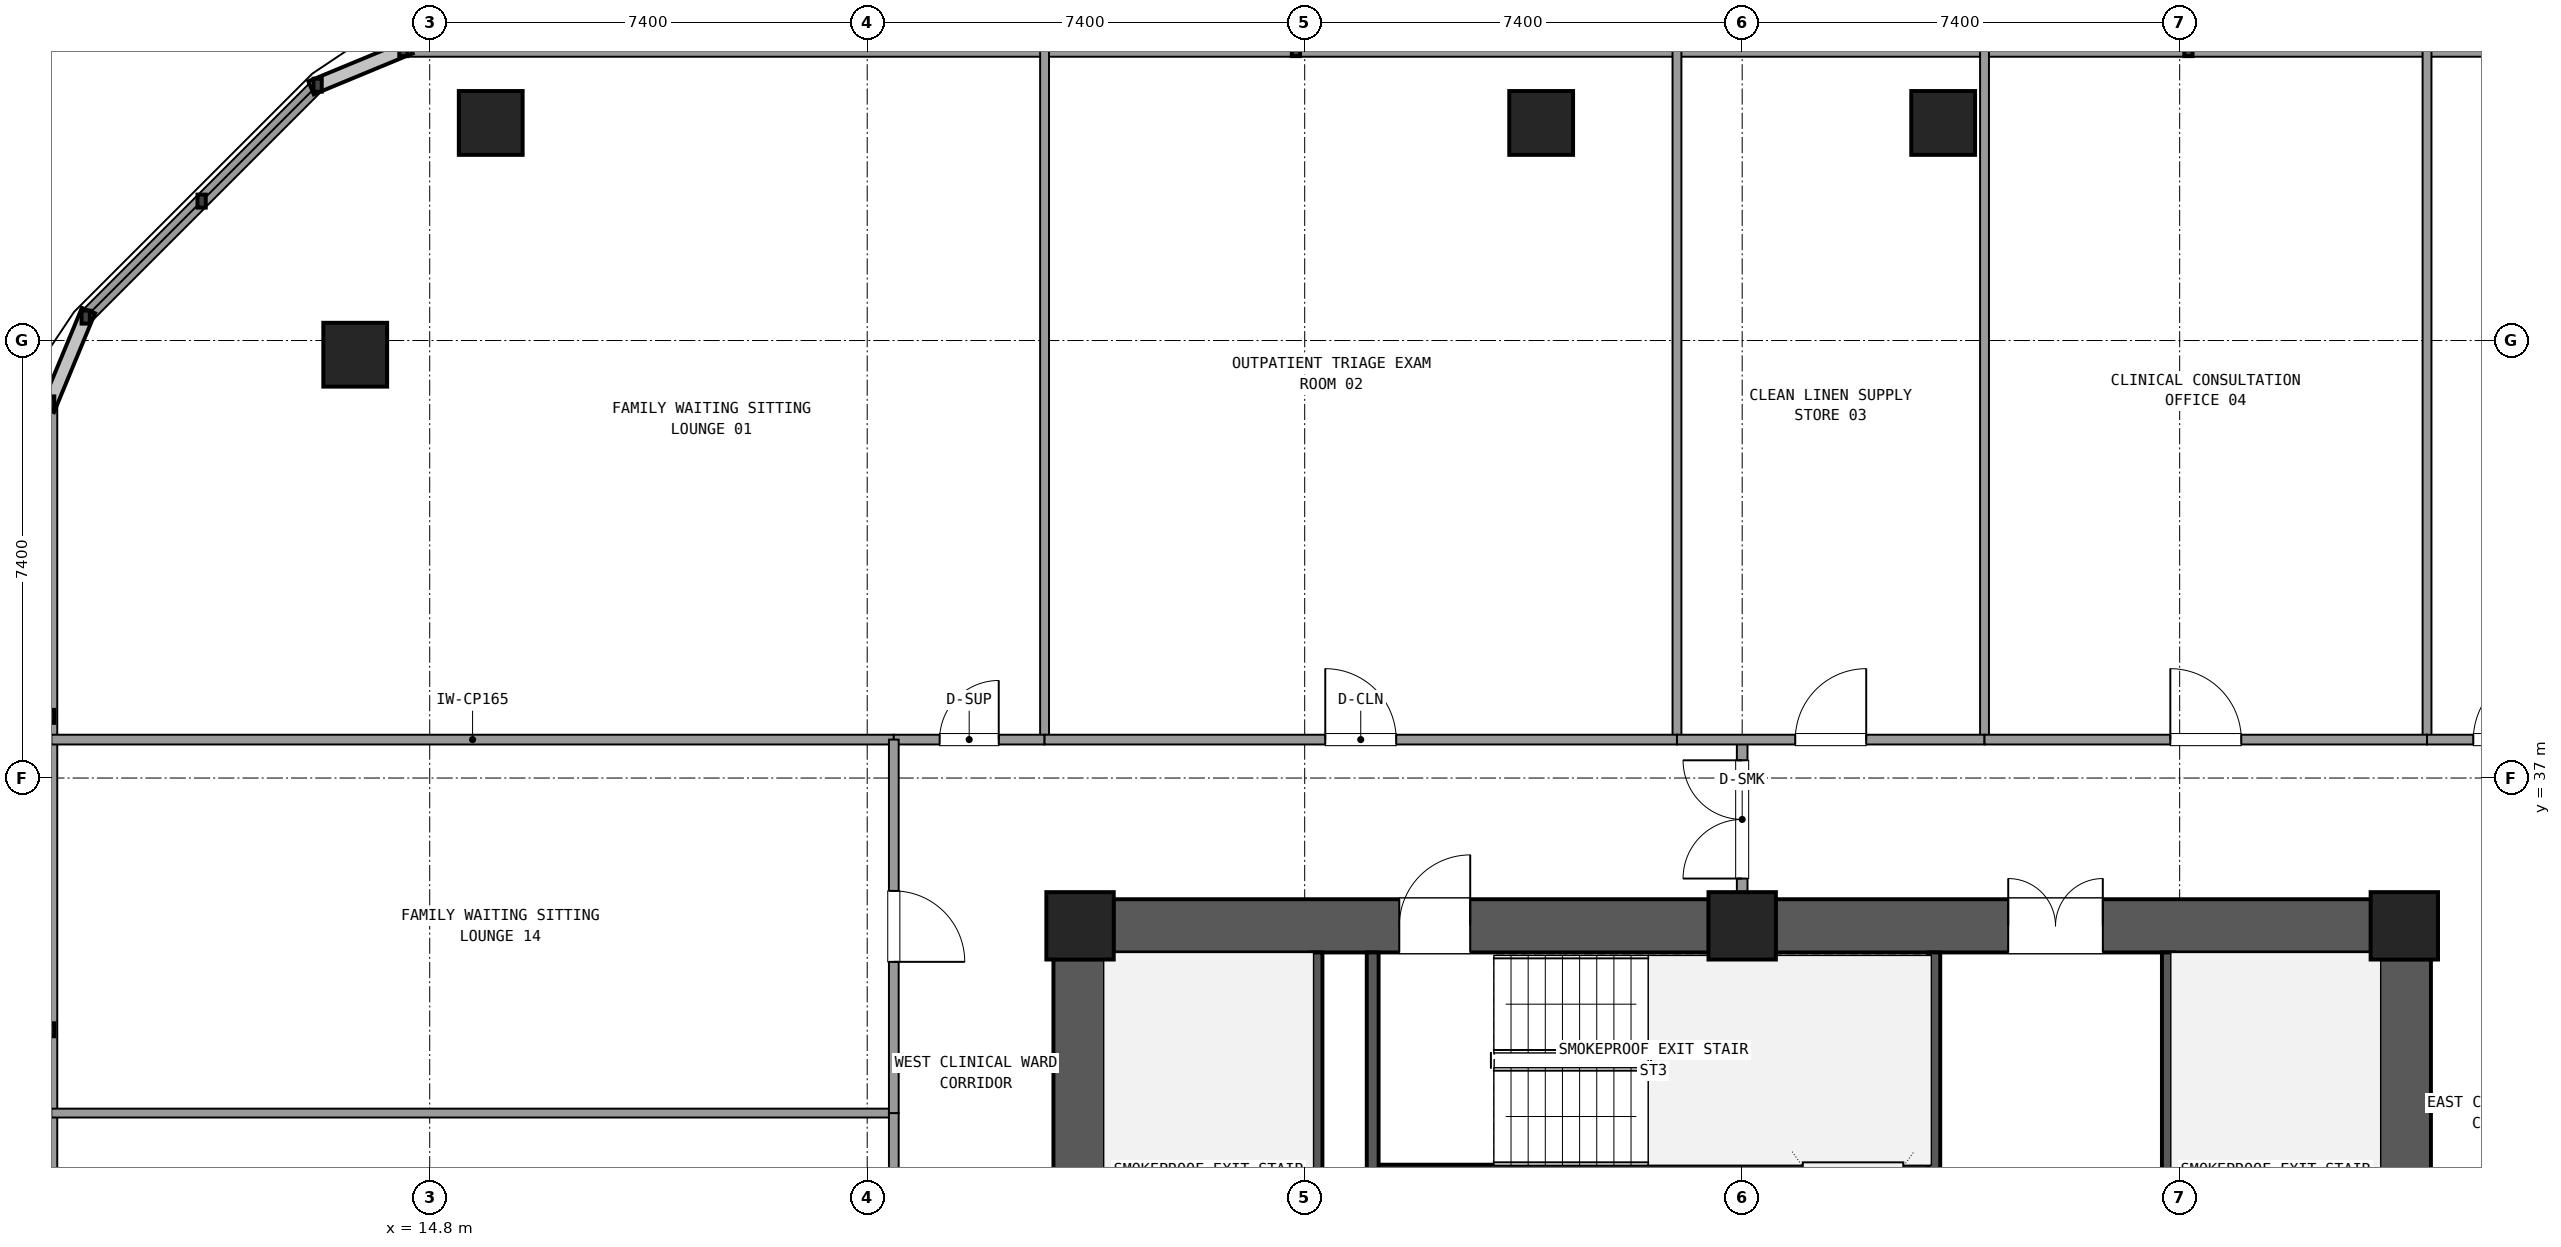
"""IFC4 building model, lengths in metres.
Left out: names, types, materials, properties, quantities, classifications, styles, units other than length and angle.
Written with IfcOpenShell. Run it as: python <this file> out.ifc"""

import sys

from ifc_helpers import new_model, si_unit, direction, frame, frame_2d, origin, origin_2d, place, context, subcontext, project, spatial, rectangle, extrude, element, fill, save


model = new_model("IFC4")
c1 = context("Model", 3, precision=1e-05, world=origin(), true_north=direction((0.0, 1.0)))
c2 = subcontext(c1, "Body", "Model", "MODEL_VIEW")
j1 = project(units=[si_unit("LENGTHUNIT", "METRE"), si_unit("PLANEANGLEUNIT", "RADIAN")], contexts=[c1])
p1 = place(None, origin())
s1 = spatial("IfcSite", under=j1, at=p1, CompositionType="ELEMENT")
p2 = place(p1, origin())
s2 = spatial("IfcBuilding", under=s1, at=p2, CompositionType="ELEMENT")
p3 = place(p2, frame((0.0, 0.0, 41.94)))
s3 = spatial("IfcBuildingStorey", under=s2, at=p3, CompositionType="ELEMENT", Elevation=41.94)
for number, where, z_axis, x_axis in (
    (1, (48.2, 34.5, 0.0), (0.0, 0.0, 1.0), (1.0, 0.0, 0.0)),
    (2, (37.0, 34.5, 0.0), (0.0, 0.0, 1.0), (1.0, 0.0, 0.0)),
    (3, (25.8, 34.5, 0.0), (0.0, 0.0, 1.0), (1.0, 0.0, 0.0)),
):
    element("IfcColumn", number, at=place(p3, frame(where, z_axis=z_axis, x_axis=x_axis)), inside=s3, PredefinedType="COLUMN", context=c2, shape_type="SweptSolid", body=[
        extrude(rectangle(XDim=1.14, YDim=1.14, at=origin_2d()), origin(), (0.0, 0.0, 1.0), 3.6),
    ])
p4 = place(p3, frame((48.2, 26.465, 0.0), z_axis=(0.0, 0.0, 1.0), x_axis=(0.0, 1.0, 0.0)))
e4 = element("IfcWall", 4, at=p4, inside=s3, PredefinedType="SHEAR", context=c2, shape_type="SweptSolid", body=[
    extrude(rectangle(XDim=7.47, YDim=0.9, at=frame_2d((3.735, 0.0))), origin(), (0.0, 0.0, 1.0), 3.32),
])
p5 = place(p3, frame((47.635, 34.5, 0.0), z_axis=(0.0, 0.0, 1.0), x_axis=(-1.0, 0.0, 0.0)))
e5 = element("IfcWall", 5, at=p5, inside=s3, PredefinedType="SHEAR", context=c2, shape_type="SweptSolid", body=[
    extrude(rectangle(XDim=10.07, YDim=0.9, at=frame_2d((5.035, 0.0))), origin(), (0.0, 0.0, 1.0), 3.32),
])
p6 = place(p5, frame((4.535, 0.0, 0.0)))
e6 = element("IfcOpeningElement", 6, at=p6, cuts=e5, PredefinedType="OPENING", context=c2, shape_type="SweptSolid", body=[
    extrude(rectangle(XDim=1.6, YDim=2.2, at=frame_2d((0.8, 1.1))), frame((0.0, 0.46, 0.0), z_axis=(0.0, -1.0, 0.0), x_axis=(1.0, 0.0, 0.0)), (0.0, 0.0, 1.0), 0.92),
])
p7 = place(p3, frame((36.435, 34.5, 0.0), z_axis=(0.0, 0.0, 1.0), x_axis=(-1.0, 0.0, 0.0)))
e7 = element("IfcWall", 7, at=p7, inside=s3, PredefinedType="SHEAR", context=c2, shape_type="SweptSolid", body=[
    extrude(rectangle(XDim=10.07, YDim=0.9, at=frame_2d((5.035, 0.0))), origin(), (0.0, 0.0, 1.0), 3.32),
])
p8 = place(p7, frame((4.035, 0.0, 0.0)))
e8 = element("IfcOpeningElement", 8, at=p8, cuts=e7, PredefinedType="OPENING", context=c2, shape_type="SweptSolid", body=[
    extrude(rectangle(XDim=1.2, YDim=2.15, at=frame_2d((0.6, 1.075))), frame((0.0, 0.46, 0.0), z_axis=(0.0, -1.0, 0.0), x_axis=(1.0, 0.0, 0.0)), (0.0, 0.0, 1.0), 0.92),
])
p9 = place(p3, frame((25.8, 33.935, 0.0), z_axis=(0.0, 0.0, 1.0), x_axis=(0.0, -1.0, 0.0)))
e9 = element("IfcWall", 9, at=p9, inside=s3, PredefinedType="SHEAR", context=c2, shape_type="SweptSolid", body=[
    extrude(rectangle(XDim=7.47, YDim=0.9, at=frame_2d((3.735, 0.0))), origin(), (0.0, 0.0, 1.0), 3.32),
])
for number, where, z_axis, x_axis in (
    (10, (40.4, 48.08, 0.0), (0.0, 0.0, 1.0), (1.0, 0.0, 0.0)),
    (11, (33.6, 48.08, 0.0), (0.0, 0.0, 1.0), (1.0, 0.0, 0.0)),
    (12, (15.832, 48.08, 0.0), (0.0, 0.0, 1.0), (1.0, 0.0, 0.0)),
    (13, (13.54, 44.16, 0.0), (0.0, 0.0, 1.0), (1.0, 0.0, 0.0)),
):
    element("IfcColumn", number, at=place(p3, frame(where, z_axis=z_axis, x_axis=x_axis)), inside=s3, PredefinedType="COLUMN", context=c2, shape_type="SweptSolid", body=[
        extrude(rectangle(XDim=1.08, YDim=1.08, at=origin_2d()), origin(), (0.0, 0.0, 1.0), 3.6),
    ])
p10 = place(p3, frame((59.645, 49.32, 0.0), z_axis=(0.0, 0.0, 1.0), x_axis=(-1.0, 0.0, 0.0)))
e14 = element("IfcWall", 14, at=p10, inside=s3, PredefinedType="SOLIDWALL", context=c2, shape_type="SweptSolid", body=[
    extrude(rectangle(XDim=45.29, YDim=0.24, at=frame_2d((22.645, 0.0))), origin(), (0.0, 0.0, 1.0), 0.85),
])
p11 = place(p3, frame((12.904, 48.719, 0.0), z_axis=(0.0, 0.0, 1.0), x_axis=(-0.707106781187, -0.707106781187, 0.0)))
e15 = element("IfcWall", 15, at=p11, inside=s3, PredefinedType="SOLIDWALL", context=c2, shape_type="SweptSolid", body=[
    extrude(rectangle(XDim=5.548, YDim=0.24, at=frame_2d((2.774, 0.0))), origin(), (0.0, 0.0, 1.0), 0.85),
])
p12 = place(p3, frame((8.38, 43.345, 0.0), z_axis=(0.0, 0.0, 1.0), x_axis=(0.0, -1.0, 0.0)))
e16 = element("IfcWall", 16, at=p12, inside=s3, PredefinedType="SOLIDWALL", context=c2, shape_type="SweptSolid", body=[
    extrude(rectangle(XDim=15.905, YDim=0.24, at=frame_2d((7.953, 0.0))), origin(), (0.0, 0.0, 1.0), 0.85),
])
for number, where, z_axis, x_axis in (
    (17, (29.8, 24.65, 0.0), (0.0, 0.0, 1.0), (0.0, 1.0, 0.0)),
    (18, (44.2, 24.65, 0.0), (0.0, 0.0, 1.0), (0.0, 1.0, 0.0)),
):
    element("IfcWall", number, at=place(p3, frame(where, z_axis=z_axis, x_axis=x_axis)), inside=s3, PredefinedType="SHEAR", context=c2, shape_type="SweptSolid", body=[
        extrude(rectangle(XDim=9.4, YDim=0.2, at=frame_2d((4.7, 0.0))), origin(), (0.0, 0.0, 1.0), 3.32),
    ])
p13 = place(p3, frame((30.75, 30.36, 0.0), z_axis=(0.0, 0.0, 1.0), x_axis=(1.0, 0.0, 0.0)))
e19 = element("IfcWall", 19, at=p13, inside=s3, PredefinedType="SHEAR", context=c2, shape_type="SweptSolid", body=[
    extrude(rectangle(XDim=9.5, YDim=0.2, at=frame_2d((4.75, 0.0))), origin(), (0.0, 0.0, 1.0), 3.32),
])
for number, where, z_axis, x_axis in (
    (20, (30.75, 30.36, 0.0), (0.0, 0.0, 1.0), (0.0, 1.0, 0.0)),
    (21, (40.25, 30.36, 0.0), (0.0, 0.0, 1.0), (0.0, 1.0, 0.0)),
):
    element("IfcWall", number, at=place(p3, frame(where, z_axis=z_axis, x_axis=x_axis)), inside=s3, PredefinedType="SHEAR", context=c2, shape_type="SweptSolid", body=[
        extrude(rectangle(XDim=3.69, YDim=0.2, at=frame_2d((1.845, 0.0))), origin(), (0.0, 0.0, 1.0), 3.32),
    ])
p14 = place(p3, frame((37.0, 34.95, 0.0), z_axis=(0.0, 0.0, 1.0), x_axis=(0.0, 1.0, 0.0)))
e22 = element("IfcWall", 22, at=p14, inside=s3, PredefinedType="PARTITIONING", context=c2, shape_type="SweptSolid", body=[
    extrude(rectangle(XDim=2.7, YDim=0.18, at=frame_2d((1.35, 0.0))), origin(), (0.0, 0.0, 1.0), 2.61),
])
p15 = place(p14, frame((0.35, 0.0, 0.0)))
e23 = element("IfcOpeningElement", 23, at=p15, cuts=e22, PredefinedType="OPENING", context=c2, shape_type="SweptSolid", body=[
    extrude(rectangle(XDim=2.0, YDim=2.2, at=frame_2d((1.0, 1.1))), frame((0.0, 0.1, 0.0), z_axis=(0.0, -1.0, 0.0), x_axis=(1.0, 0.0, 0.0)), (0.0, 0.0, 1.0), 0.2),
])
p16 = place(p3, frame((8.4, 37.65, 0.0), z_axis=(0.0, 0.0, 1.0), x_axis=(1.0, 0.0, 0.0)))
e24 = element("IfcWall", 24, at=p16, inside=s3, PredefinedType="PARTITIONING", context=c2, shape_type="SweptSolid", body=[
    extrude(rectangle(XDim=14.25, YDim=0.165, at=frame_2d((7.125, 0.0))), origin(), (0.0, 0.0, 1.0), 2.61),
])
p17 = place(p3, frame((25.2, 37.65, 0.0), z_axis=(0.0, 0.0, 1.0), x_axis=(0.0, 1.0, 0.0)))
e25 = element("IfcWall", 25, at=p17, inside=s3, PredefinedType="PARTITIONING", context=c2, shape_type="SweptSolid", body=[
    extrude(rectangle(XDim=11.65, YDim=0.15, at=frame_2d((5.825, 0.0))), origin(), (0.0, 0.0, 1.0), 2.61),
])
p18 = place(p3, frame((22.65, 37.65, 0.0), z_axis=(0.0, 0.0, 1.0), x_axis=(1.0, 0.0, 0.0)))
e26 = element("IfcWall", 26, at=p18, inside=s3, PredefinedType="PARTITIONING", context=c2, shape_type="SweptSolid", body=[
    extrude(rectangle(XDim=2.55, YDim=0.165, at=frame_2d((1.275, 0.0))), origin(), (0.0, 0.0, 1.0), 2.61),
])
p19 = place(p18, frame((0.775, 0.0, 0.0)))
e27 = element("IfcOpeningElement", 27, at=p19, cuts=e26, PredefinedType="OPENING", context=c2, shape_type="SweptSolid", body=[
    extrude(rectangle(XDim=1.0, YDim=2.15, at=frame_2d((0.5, 1.075))), frame((0.0, 0.093, 0.0), z_axis=(0.0, -1.0, 0.0), x_axis=(1.0, 0.0, 0.0)), (0.0, 0.0, 1.0), 0.185),
])
p20 = place(p3, frame((35.897, 37.65, 0.0), z_axis=(0.0, 0.0, 1.0), x_axis=(0.0, 1.0, 0.0)))
e28 = element("IfcWall", 28, at=p20, inside=s3, PredefinedType="PARTITIONING", context=c2, shape_type="SweptSolid", body=[
    extrude(rectangle(XDim=11.65, YDim=0.15, at=frame_2d((5.825, 0.0))), origin(), (0.0, 0.0, 1.0), 2.61),
])
p21 = place(p3, frame((25.2, 37.65, 0.0), z_axis=(0.0, 0.0, 1.0), x_axis=(1.0, 0.0, 0.0)))
e29 = element("IfcWall", 29, at=p21, inside=s3, PredefinedType="PARTITIONING", context=c2, shape_type="SweptSolid", body=[
    extrude(rectangle(XDim=10.697, YDim=0.165, at=frame_2d((5.349, 0.0))), origin(), (0.0, 0.0, 1.0), 2.61),
])
p22 = place(p21, frame((4.748, 0.0, 0.0)))
e30 = element("IfcOpeningElement", 30, at=p22, cuts=e29, PredefinedType="OPENING", context=c2, shape_type="SweptSolid", body=[
    extrude(rectangle(XDim=1.2, YDim=2.15, at=frame_2d((0.6, 1.075))), frame((0.0, 0.093, 0.0), z_axis=(0.0, -1.0, 0.0), x_axis=(1.0, 0.0, 0.0)), (0.0, 0.0, 1.0), 0.185),
])
p23 = place(p3, frame((41.099, 37.65, 0.0), z_axis=(0.0, 0.0, 1.0), x_axis=(0.0, 1.0, 0.0)))
e31 = element("IfcWall", 31, at=p23, inside=s3, PredefinedType="PARTITIONING", context=c2, shape_type="SweptSolid", body=[
    extrude(rectangle(XDim=11.65, YDim=0.15, at=frame_2d((5.825, 0.0))), origin(), (0.0, 0.0, 1.0), 2.61),
])
p24 = place(p3, frame((35.897, 37.65, 0.0), z_axis=(0.0, 0.0, 1.0), x_axis=(1.0, 0.0, 0.0)))
e32 = element("IfcWall", 32, at=p24, inside=s3, PredefinedType="PARTITIONING", context=c2, shape_type="SweptSolid", body=[
    extrude(rectangle(XDim=5.202, YDim=0.165, at=frame_2d((2.601, 0.0))), origin(), (0.0, 0.0, 1.0), 2.61),
])
p25 = place(p24, frame((2.001, 0.0, 0.0)))
e33 = element("IfcOpeningElement", 33, at=p25, cuts=e32, PredefinedType="OPENING", context=c2, shape_type="SweptSolid", body=[
    extrude(rectangle(XDim=1.2, YDim=2.15, at=frame_2d((0.6, 1.075))), frame((0.0, 0.093, 0.0), z_axis=(0.0, -1.0, 0.0), x_axis=(1.0, 0.0, 0.0)), (0.0, 0.0, 1.0), 0.185),
])
p26 = place(p3, frame((48.584, 37.65, 0.0), z_axis=(0.0, 0.0, 1.0), x_axis=(0.0, 1.0, 0.0)))
e34 = element("IfcWall", 34, at=p26, inside=s3, PredefinedType="PARTITIONING", context=c2, shape_type="SweptSolid", body=[
    extrude(rectangle(XDim=11.65, YDim=0.15, at=frame_2d((5.825, 0.0))), origin(), (0.0, 0.0, 1.0), 2.61),
])
p27 = place(p3, frame((41.099, 37.65, 0.0), z_axis=(0.0, 0.0, 1.0), x_axis=(1.0, 0.0, 0.0)))
e35 = element("IfcWall", 35, at=p27, inside=s3, PredefinedType="PARTITIONING", context=c2, shape_type="SweptSolid", body=[
    extrude(rectangle(XDim=7.485, YDim=0.165, at=frame_2d((3.742, 0.0))), origin(), (0.0, 0.0, 1.0), 2.61),
])
p28 = place(p27, frame((3.143, 0.0, 0.0)))
e36 = element("IfcOpeningElement", 36, at=p28, cuts=e35, PredefinedType="OPENING", context=c2, shape_type="SweptSolid", body=[
    extrude(rectangle(XDim=1.2, YDim=2.15, at=frame_2d((0.6, 1.075))), frame((0.0, 0.093, 0.0), z_axis=(0.0, -1.0, 0.0), x_axis=(1.0, 0.0, 0.0)), (0.0, 0.0, 1.0), 0.185),
])
p29 = place(p3, frame((48.584, 37.65, 0.0), z_axis=(0.0, 0.0, 1.0), x_axis=(1.0, 0.0, 0.0)))
e37 = element("IfcWall", 37, at=p29, inside=s3, PredefinedType="PARTITIONING", context=c2, shape_type="SweptSolid", body=[
    extrude(rectangle(XDim=2.766, YDim=0.165, at=frame_2d((1.383, 0.0))), origin(), (0.0, 0.0, 1.0), 2.61),
])
p30 = place(p29, frame((0.783, 0.0, 0.0)))
e38 = element("IfcOpeningElement", 38, at=p30, cuts=e37, PredefinedType="OPENING", context=c2, shape_type="SweptSolid", body=[
    extrude(rectangle(XDim=1.2, YDim=2.15, at=frame_2d((0.6, 1.075))), frame((0.0, 0.093, 0.0), z_axis=(0.0, -1.0, 0.0), x_axis=(1.0, 0.0, 0.0)), (0.0, 0.0, 1.0), 0.185),
])
p31 = place(p3, frame((22.65, 31.333, 0.0), z_axis=(0.0, 0.0, 1.0), x_axis=(-1.0, 0.0, 0.0)))
e39 = element("IfcWall", 39, at=p31, inside=s3, PredefinedType="PARTITIONING", context=c2, shape_type="SweptSolid", body=[
    extrude(rectangle(XDim=14.25, YDim=0.15, at=frame_2d((7.125, 0.0))), origin(), (0.0, 0.0, 1.0), 2.61),
])
p32 = place(p3, frame((22.65, 27.7, 0.0), z_axis=(0.0, 0.0, 1.0), x_axis=(0.0, 1.0, 0.0)))
e40 = element("IfcWall", 40, at=p32, inside=s3, PredefinedType="PARTITIONING", context=c2, shape_type="SweptSolid", body=[
    extrude(rectangle(XDim=3.633, YDim=0.165, at=frame_2d((1.816, 0.0))), origin(), (0.0, 0.0, 1.0), 2.61),
])
p33 = place(p32, frame((1.216, 0.0, 0.0)))
e41 = element("IfcOpeningElement", 41, at=p33, cuts=e40, PredefinedType="OPENING", context=c2, shape_type="SweptSolid", body=[
    extrude(rectangle(XDim=1.2, YDim=2.15, at=frame_2d((0.6, 1.075))), frame((0.0, 0.093, 0.0), z_axis=(0.0, -1.0, 0.0), x_axis=(1.0, 0.0, 0.0)), (0.0, 0.0, 1.0), 0.185),
])
p34 = place(p3, frame((22.65, 31.333, 0.0), z_axis=(0.0, 0.0, 1.0), x_axis=(0.0, 1.0, 0.0)))
e42 = element("IfcWall", 42, at=p34, inside=s3, PredefinedType="PARTITIONING", context=c2, shape_type="SweptSolid", body=[
    extrude(rectangle(XDim=6.317, YDim=0.165, at=frame_2d((3.158, 0.0))), origin(), (0.0, 0.0, 1.0), 2.61),
])
p35 = place(p34, frame((2.558, 0.0, 0.0)))
e43 = element("IfcOpeningElement", 43, at=p35, cuts=e42, PredefinedType="OPENING", context=c2, shape_type="SweptSolid", body=[
    extrude(rectangle(XDim=1.2, YDim=2.15, at=frame_2d((0.6, 1.075))), frame((0.0, 0.093, 0.0), z_axis=(0.0, -1.0, 0.0), x_axis=(1.0, 0.0, 0.0)), (0.0, 0.0, 1.0), 0.185),
])
p36 = place(p6, frame((1.6, 0.0, 0.0), z_axis=(0.0, 0.0, 1.0), x_axis=(-1.0, 0.0, 0.0)))
e44 = element("IfcDoor", 44, at=p36, inside=s3, OperationType="DOUBLE_DOOR_SINGLE_SWING", PredefinedType="DOOR", context=c2, shape_type="SweptSolid", body=[
    extrude(rectangle(XDim=1.6, YDim=2.2, at=frame_2d((0.8, 1.1))), frame((0.0, 0.025, 0.0), z_axis=(0.0, -1.0, 0.0), x_axis=(1.0, 0.0, 0.0)), (0.0, 0.0, 1.0), 0.05),
])
fill(e6, e44)
p37 = place(p8, frame((1.2, 0.0, 0.0), z_axis=(0.0, 0.0, 1.0), x_axis=(-1.0, 0.0, 0.0)))
e45 = element("IfcDoor", 45, at=p37, inside=s3, OperationType="SINGLE_SWING_LEFT", PredefinedType="DOOR", context=c2, shape_type="SweptSolid", body=[
    extrude(rectangle(XDim=1.2, YDim=2.15, at=frame_2d((0.6, 1.075))), frame((0.0, 0.025, 0.0), z_axis=(0.0, -1.0, 0.0), x_axis=(1.0, 0.0, 0.0)), (0.0, 0.0, 1.0), 0.05),
])
fill(e8, e45)
p38 = place(p15, origin())
e46 = element("IfcDoor", 46, at=p38, inside=s3, OperationType="DOUBLE_DOOR_SINGLE_SWING", PredefinedType="DOOR", context=c2, shape_type="SweptSolid", body=[
    extrude(rectangle(XDim=2.0, YDim=2.2, at=frame_2d((1.0, 1.1))), frame((0.0, 0.025, 0.0), z_axis=(0.0, -1.0, 0.0), x_axis=(1.0, 0.0, 0.0)), (0.0, 0.0, 1.0), 0.05),
])
fill(e23, e46)
p39 = place(p19, origin())
e47 = element("IfcDoor", 47, at=p39, inside=s3, OperationType="SINGLE_SWING_RIGHT", PredefinedType="DOOR", context=c2, shape_type="SweptSolid", body=[
    extrude(rectangle(XDim=1.0, YDim=2.15, at=frame_2d((0.5, 1.075))), frame((0.0, 0.025, 0.0), z_axis=(0.0, -1.0, 0.0), x_axis=(1.0, 0.0, 0.0)), (0.0, 0.0, 1.0), 0.05),
])
fill(e27, e47)
p40 = place(p22, origin())
e48 = element("IfcDoor", 48, at=p40, inside=s3, OperationType="SINGLE_SWING_LEFT", PredefinedType="DOOR", context=c2, shape_type="SweptSolid", body=[
    extrude(rectangle(XDim=1.2, YDim=2.15, at=frame_2d((0.6, 1.075))), frame((0.0, 0.025, 0.0), z_axis=(0.0, -1.0, 0.0), x_axis=(1.0, 0.0, 0.0)), (0.0, 0.0, 1.0), 0.05),
])
fill(e30, e48)
p41 = place(p25, origin())
e49 = element("IfcDoor", 49, at=p41, inside=s3, OperationType="SINGLE_SWING_RIGHT", PredefinedType="DOOR", context=c2, shape_type="SweptSolid", body=[
    extrude(rectangle(XDim=1.2, YDim=2.15, at=frame_2d((0.6, 1.075))), frame((0.0, 0.025, 0.0), z_axis=(0.0, -1.0, 0.0), x_axis=(1.0, 0.0, 0.0)), (0.0, 0.0, 1.0), 0.05),
])
fill(e33, e49)
p42 = place(p28, origin())
e50 = element("IfcDoor", 50, at=p42, inside=s3, OperationType="SINGLE_SWING_LEFT", PredefinedType="DOOR", context=c2, shape_type="SweptSolid", body=[
    extrude(rectangle(XDim=1.2, YDim=2.15, at=frame_2d((0.6, 1.075))), frame((0.0, 0.025, 0.0), z_axis=(0.0, -1.0, 0.0), x_axis=(1.0, 0.0, 0.0)), (0.0, 0.0, 1.0), 0.05),
])
fill(e36, e50)
p43 = place(p30, origin())
e51 = element("IfcDoor", 51, at=p43, inside=s3, OperationType="SINGLE_SWING_RIGHT", PredefinedType="DOOR", context=c2, shape_type="SweptSolid", body=[
    extrude(rectangle(XDim=1.2, YDim=2.15, at=frame_2d((0.6, 1.075))), frame((0.0, 0.025, 0.0), z_axis=(0.0, -1.0, 0.0), x_axis=(1.0, 0.0, 0.0)), (0.0, 0.0, 1.0), 0.05),
])
fill(e38, e51)
p44 = place(p35, frame((1.2, 0.0, 0.0), z_axis=(0.0, 0.0, 1.0), x_axis=(-1.0, 0.0, 0.0)))
e52 = element("IfcDoor", 52, at=p44, inside=s3, OperationType="SINGLE_SWING_LEFT", PredefinedType="DOOR", context=c2, shape_type="SweptSolid", body=[
    extrude(rectangle(XDim=1.2, YDim=2.15, at=frame_2d((0.6, 1.075))), frame((0.0, 0.025, 0.0), z_axis=(0.0, -1.0, 0.0), x_axis=(1.0, 0.0, 0.0)), (0.0, 0.0, 1.0), 0.05),
])
fill(e43, e52)
save(model, sys.argv[1])
